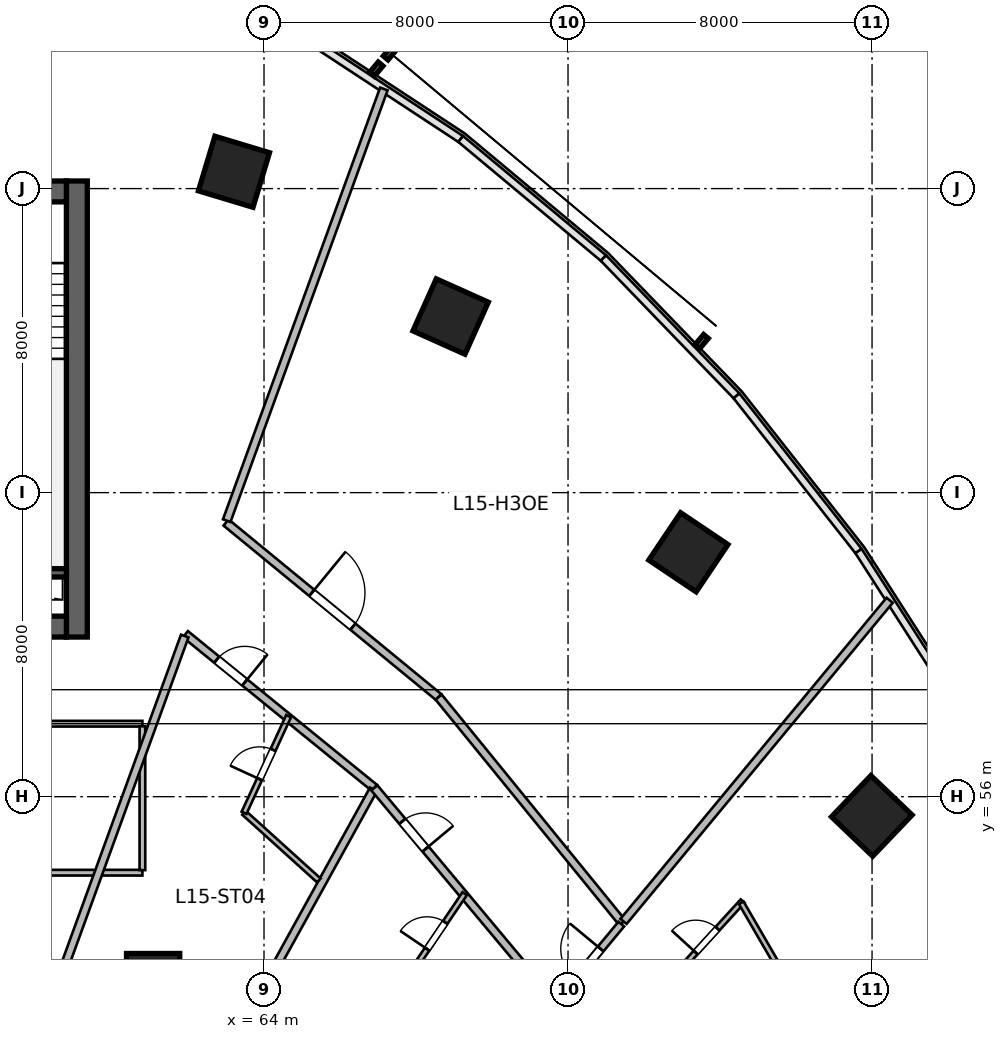
"""IFC4 building model, lengths in metres.
Left out: names, types, materials, properties, quantities, classifications, styles, units other than length and angle.
Written with IfcOpenShell. Run it as: python <this file> out.ifc"""

import sys

from ifc_helpers import new_model, si_unit, direction, frame, frame_2d, origin, origin_2d, place, context, subcontext, project, spatial, rectangle, circle, extrude, source, transform, mapped, element, fill, save


model = new_model("IFC4")
c1 = context("Model", 3, precision=1e-05, world=origin(), true_north=direction((0.0, 1.0)))
c2 = subcontext(c1, "Body", "Model", "MODEL_VIEW")
j1 = project(units=[si_unit("LENGTHUNIT", "METRE"), si_unit("PLANEANGLEUNIT", "RADIAN")], contexts=[c1])
p1 = place(None, origin())
s1 = spatial("IfcSite", under=j1, at=p1, CompositionType="ELEMENT")
p2 = place(p1, origin())
s2 = spatial("IfcBuilding", under=s1, at=p2, CompositionType="ELEMENT")
p3 = place(p2, frame((0.0, 0.0, 67.8)))
s3 = spatial("IfcBuildingStorey", under=s2, at=p3, CompositionType="ELEMENT", Elevation=67.8)
m1 = source(origin(), c2, "Body", "SweptSolid", [
    extrude(rectangle(XDim=12.0, YDim=0.55, at=frame_2d((6.0, 0.0))), origin(), (0.0, 0.0, 1.0), 3.6),
])
p4 = place(p3, frame((59.075, 60.2, 0.0), z_axis=(0.0, 0.0, 1.0), x_axis=(0.0, 1.0, 0.0)))
e1 = element("IfcWall", 1, at=p4, inside=s3, PredefinedType="SHEAR", context=c2, shape_type="MappedRepresentation", body=[
    mapped(m1, transform((0.0, 0.0, 0.0), scale=1.0)),
])
m2 = source(origin(), c2, "Body", "SweptSolid", [
    extrude(rectangle(XDim=21.6, YDim=0.55, at=frame_2d((10.8, 0.0))), origin(), (0.0, 0.0, 1.0), 3.6),
])
p5 = place(p3, frame((37.2, 60.475, 0.0), z_axis=(0.0, 0.0, 1.0), x_axis=(1.0, 0.0, 0.0)))
e2 = element("IfcWall", 2, at=p5, inside=s3, PredefinedType="SHEAR", context=c2, shape_type="MappedRepresentation", body=[
    mapped(m2, transform((0.0, 0.0, 0.0), scale=1.0)),
])
p6 = place(p5, frame((1.1, 0.0, 0.0)))
e3 = element("IfcOpeningElement", 3, at=p6, cuts=e2, PredefinedType="OPENING", context=c2, shape_type="SweptSolid", body=[
    extrude(rectangle(XDim=1.15, YDim=2.15, at=frame_2d((0.575, 1.075))), frame((0.0, 0.285, 0.0), z_axis=(0.0, -1.0, 0.0), x_axis=(1.0, 0.0, 0.0)), (0.0, 0.0, 1.0), 0.57),
])
p7 = place(p5, frame((19.5, 0.0, 0.0)))
e4 = element("IfcOpeningElement", 4, at=p7, cuts=e2, PredefinedType="OPENING", context=c2, shape_type="SweptSolid", body=[
    extrude(rectangle(XDim=0.9, YDim=2.1, at=frame_2d((0.45, 1.05))), frame((0.0, 0.285, 0.0), z_axis=(0.0, -1.0, 0.0), x_axis=(1.0, 0.0, 0.0)), (0.0, 0.0, 1.0), 0.57),
])
p8 = place(p5, frame((12.02, 0.0, 0.0)))
e5 = element("IfcOpeningElement", 5, at=p8, cuts=e2, PredefinedType="OPENING", context=c2, shape_type="SweptSolid", body=[
    extrude(rectangle(XDim=1.6, YDim=2.15, at=frame_2d((0.8, 1.075))), frame((0.0, 0.285, 0.0), z_axis=(0.0, -1.0, 0.0), x_axis=(1.0, 0.0, 0.0)), (0.0, 0.0, 1.0), 0.57),
])
p9 = place(p3, frame((37.2, 71.925, 0.0), z_axis=(0.0, 0.0, 1.0), x_axis=(1.0, 0.0, 0.0)))
e6 = element("IfcWall", 6, at=p9, inside=s3, PredefinedType="SHEAR", context=c2, shape_type="MappedRepresentation", body=[
    mapped(m2, transform((0.0, 0.0, 0.0), scale=1.0)),
])
p10 = place(p9, frame((1.2, 0.0, 0.0)))
e7 = element("IfcOpeningElement", 7, at=p10, cuts=e6, PredefinedType="OPENING", context=c2, shape_type="SweptSolid", body=[
    extrude(rectangle(XDim=0.9, YDim=2.1, at=frame_2d((0.45, 1.05))), frame((0.0, 0.285, 0.0), z_axis=(0.0, -1.0, 0.0), x_axis=(1.0, 0.0, 0.0)), (0.0, 0.0, 1.0), 0.57),
])
p11 = place(p9, frame((14.7, 0.0, 0.0)))
e8 = element("IfcOpeningElement", 8, at=p11, cuts=e6, PredefinedType="OPENING", context=c2, shape_type="SweptSolid", body=[
    extrude(rectangle(XDim=1.2, YDim=2.15, at=frame_2d((0.6, 1.075))), frame((0.0, 0.285, 0.0), z_axis=(0.0, -1.0, 0.0), x_axis=(1.0, 0.0, 0.0)), (0.0, 0.0, 1.0), 0.57),
])
p12 = place(p9, frame((4.15, 0.0, 0.0)))
e9 = element("IfcOpeningElement", 9, at=p12, cuts=e6, PredefinedType="OPENING", context=c2, shape_type="SweptSolid", body=[
    extrude(rectangle(XDim=1.3, YDim=2.15, at=frame_2d((0.65, 1.075))), frame((0.0, 0.285, 0.0), z_axis=(0.0, -1.0, 0.0), x_axis=(1.0, 0.0, 0.0)), (0.0, 0.0, 1.0), 0.57),
])
p13 = place(p9, frame((7.1, 0.0, 0.0)))
e10 = element("IfcOpeningElement", 10, at=p13, cuts=e6, PredefinedType="OPENING", context=c2, shape_type="SweptSolid", body=[
    extrude(rectangle(XDim=0.9, YDim=2.1, at=frame_2d((0.45, 1.05))), frame((0.0, 0.285, 0.0), z_axis=(0.0, -1.0, 0.0), x_axis=(1.0, 0.0, 0.0)), (0.0, 0.0, 1.0), 0.57),
])
m3 = source(origin(), c2, "Body", "SweptSolid", [
    extrude(rectangle(XDim=3.27, YDim=0.22, at=frame_2d((1.635, 0.0))), origin(), (0.0, 0.0, 1.0), 3.6),
])
p14 = place(p3, frame((55.53, 61.89, 0.0), z_axis=(0.0, 0.0, 1.0), x_axis=(1.0, 0.0, 0.0)))
e11 = element("IfcWall", 11, at=p14, inside=s3, PredefinedType="SHEAR", context=c2, shape_type="MappedRepresentation", body=[
    mapped(m3, transform((0.0, 0.0, 0.0), scale=1.0)),
])
m4 = source(origin(), c2, "Body", "SweptSolid", [
    extrude(rectangle(XDim=1.5, YDim=1.5, at=origin_2d()), origin(), (0.0, 0.0, 1.0), 3.6),
])
p15 = place(p3, frame((63.209, 72.442, 0.0), z_axis=(0.0, 0.0, 1.0), x_axis=(0.288697611798, 0.957420330337, 0.0)))
e12 = element("IfcColumn", 12, at=p15, inside=s3, PredefinedType="COLUMN", context=c2, shape_type="MappedRepresentation", body=[
    mapped(m4, transform((0.0, 0.0, 0.0), scale=1.0)),
])
m5 = source(origin(), c2, "Body", "SweptSolid", [
    extrude(circle(Radius=0.7, at=origin_2d()), origin(), (0.0, 0.0, 1.0), 3.6),
])
p16 = place(p3, frame((61.082, 51.175, 0.0), z_axis=(0.0, 0.0, 1.0), x_axis=(0.409126902895, 0.912477494148, 0.0)))
e13 = element("IfcColumn", 13, at=p16, inside=s3, PredefinedType="COLUMN", context=c2, shape_type="MappedRepresentation", body=[
    mapped(m5, transform((0.0, 0.0, 0.0), scale=1.0)),
])
for number, where, z_axis, x_axis in (
    (14, (68.91, 68.633, 0.0), (0.0, 0.0, 1.0), (0.409, 0.912, 0.0)),
    (15, (75.167, 62.43, 0.0), (0.0, 0.0, 1.0), (0.558, 0.83, 0.0)),
    (16, (79.993, 55.494, 0.0), (0.0, 0.0, 1.0), (0.691, 0.723, 0.0)),
):
    element("IfcColumn", number, at=place(p3, frame(where, z_axis=z_axis, x_axis=x_axis)), inside=s3, PredefinedType="COLUMN", context=c2, shape_type="MappedRepresentation", body=[
        mapped(m4, transform((0.0, 0.0, 0.0), scale=1.0)),
    ])
m6 = source(origin(), c2, "Body", "SweptSolid", [
    extrude(rectangle(XDim=6.6, YDim=0.15, at=frame_2d((3.3, 0.0))), origin(), (0.0, 0.0, 1.0), 2.803),
])
p17 = place(p3, frame((54.2, 54.0, 0.0), z_axis=(0.0, 0.0, 1.0), x_axis=(1.0, 0.0, 0.0)))
e17 = element("IfcWall", 17, at=p17, inside=s3, PredefinedType="PARTITIONING", context=c2, shape_type="MappedRepresentation", body=[
    mapped(m6, transform((0.0, 0.0, 0.0), scale=1.0)),
])
m7 = source(origin(), c2, "Body", "SweptSolid", [
    extrude(rectangle(XDim=6.6, YDim=0.15, at=frame_2d((3.3, 0.0))), origin(), (0.0, 0.0, 1.0), 3.36),
])
p18 = place(p3, frame((54.2, 57.92, 0.0), z_axis=(0.0, 0.0, 1.0), x_axis=(1.0, 0.0, 0.0)))
e18 = element("IfcWall", 18, at=p18, inside=s3, PredefinedType="PARTITIONING", context=c2, shape_type="MappedRepresentation", body=[
    mapped(m7, transform((0.0, 0.0, 0.0), scale=1.0)),
])
p19 = place(p18, frame((2.825, 0.0, 0.0)))
e19 = element("IfcOpeningElement", 19, at=p19, cuts=e18, PredefinedType="OPENING", context=c2, shape_type="SweptSolid", body=[
    extrude(rectangle(XDim=0.95, YDim=2.1, at=frame_2d((0.475, 1.05))), frame((0.0, 0.085, 0.0), z_axis=(0.0, -1.0, 0.0), x_axis=(1.0, 0.0, 0.0)), (0.0, 0.0, 1.0), 0.17),
])
m8 = source(origin(), c2, "Body", "SweptSolid", [
    extrude(rectangle(XDim=3.785, YDim=0.15, at=frame_2d((1.893, 0.0))), origin(), (0.0, 0.0, 1.0), 3.36),
])
p20 = place(p3, frame((60.8, 54.067, 0.0), z_axis=(0.0, 0.0, 1.0), x_axis=(0.0, 1.0, 0.0)))
e20 = element("IfcWall", 20, at=p20, inside=s3, PredefinedType="PARTITIONING", context=c2, shape_type="MappedRepresentation", body=[
    mapped(m8, transform((0.0, 0.0, 0.0), scale=1.0)),
])
m9 = source(origin(), c2, "Body", "SweptSolid", [
    extrude(rectangle(XDim=7.237, YDim=0.21, at=frame_2d((3.618, 0.0))), origin(), (0.0, 0.0, 1.0), 3.36),
])
p21 = place(p3, frame((63.001, 63.214, 0.0), z_axis=(0.0, 0.0, 1.0), x_axis=(0.772813707793, -0.634632943557, 0.0)))
e21 = element("IfcWall", 21, at=p21, inside=s3, PredefinedType="PARTITIONING", context=c2, shape_type="MappedRepresentation", body=[
    mapped(m9, transform((0.0, 0.0, 0.0), scale=1.0)),
])
p22 = place(p21, frame((2.918, 0.0, 0.0)))
e22 = element("IfcOpeningElement", 22, at=p22, cuts=e21, PredefinedType="OPENING", context=c2, shape_type="SweptSolid", body=[
    extrude(rectangle(XDim=1.4, YDim=2.15, at=frame_2d((0.7, 1.075))), frame((0.0, 0.115, 0.0), z_axis=(0.0, -1.0, 0.0), x_axis=(1.0, 0.0, 0.0)), (0.0, 0.0, 1.0), 0.23),
])
m10 = source(origin(), c2, "Body", "SweptSolid", [
    extrude(rectangle(XDim=7.659, YDim=0.21, at=frame_2d((3.829, 0.0))), origin(), (0.0, 0.0, 1.0), 3.36),
])
p23 = place(p3, frame((68.594, 58.621, 0.0), z_axis=(0.0, 0.0, 1.0), x_axis=(0.631489868862, -0.775384127723, 0.0)))
e23 = element("IfcWall", 23, at=p23, inside=s3, PredefinedType="PARTITIONING", context=c2, shape_type="MappedRepresentation", body=[
    mapped(m10, transform((0.0, 0.0, 0.0), scale=1.0)),
])
m11 = source(origin(), c2, "Body", "SweptSolid", [
    extrude(rectangle(XDim=12.088, YDim=0.21, at=frame_2d((6.044, 0.0))), origin(), (0.0, 0.0, 1.0), 3.36),
])
p24 = place(p3, frame((63.019, 63.262, 0.0), z_axis=(0.0, 0.0, 1.0), x_axis=(0.34203007529, 0.939689005787, 0.0)))
e24 = element("IfcWall", 24, at=p24, inside=s3, PredefinedType="PARTITIONING", context=c2, shape_type="MappedRepresentation", body=[
    mapped(m11, transform((0.0, 0.0, 0.0), scale=1.0)),
])
m12 = source(origin(), c2, "Body", "SweptSolid", [
    extrude(rectangle(XDim=10.975, YDim=0.21, at=frame_2d((5.487, 0.0))), origin(), (0.0, 0.0, 1.0), 3.36),
])
p25 = place(p3, frame((73.46, 52.719, 0.0), z_axis=(0.0, 0.0, 1.0), x_axis=(0.638125265812, 0.769932558821, 0.0)))
e25 = element("IfcWall", 25, at=p25, inside=s3, PredefinedType="PARTITIONING", context=c2, shape_type="MappedRepresentation", body=[
    mapped(m12, transform((0.0, 0.0, 0.0), scale=1.0)),
])
m13 = source(origin(), c2, "Body", "SweptSolid", [
    extrude(rectangle(XDim=6.408, YDim=0.21, at=frame_2d((3.204, 0.0))), origin(), (0.0, 0.0, 1.0), 3.36),
])
p26 = place(p3, frame((61.931, 60.275, 0.0), z_axis=(0.0, 0.0, 1.0), x_axis=(0.775878552904, -0.630882295792, 0.0)))
e26 = element("IfcWall", 26, at=p26, inside=s3, PredefinedType="PARTITIONING", context=c2, shape_type="MappedRepresentation", body=[
    mapped(m13, transform((0.0, 0.0, 0.0), scale=1.0)),
])
p27 = place(p26, frame((1.063, 0.0, 0.0)))
e27 = element("IfcOpeningElement", 27, at=p27, cuts=e26, PredefinedType="OPENING", context=c2, shape_type="SweptSolid", body=[
    extrude(rectangle(XDim=0.95, YDim=2.15, at=frame_2d((0.475, 1.075))), frame((0.0, 0.115, 0.0), z_axis=(0.0, -1.0, 0.0), x_axis=(1.0, 0.0, 0.0)), (0.0, 0.0, 1.0), 0.23),
])
m14 = source(origin(), c2, "Body", "SweptSolid", [
    extrude(rectangle(XDim=12.196, YDim=0.21, at=frame_2d((6.098, 0.0))), origin(), (0.0, 0.0, 1.0), 3.36),
])
p28 = place(p3, frame((57.742, 48.766, 0.0), z_axis=(0.0, 0.0, 1.0), x_axis=(0.342022711534, 0.939691686031, 0.0)))
e28 = element("IfcWall", 28, at=p28, inside=s3, PredefinedType="PARTITIONING", context=c2, shape_type="MappedRepresentation", body=[
    mapped(m14, transform((0.0, 0.0, 0.0), scale=1.0)),
])
m15 = source(origin(), c2, "Body", "SweptSolid", [
    extrude(rectangle(XDim=11.692, YDim=0.21, at=frame_2d((5.846, 0.0))), origin(), (0.0, 0.0, 1.0), 3.093),
])
p29 = place(p3, frame((61.228, 45.954, 0.0), z_axis=(0.0, 0.0, 1.0), x_axis=(0.483398579324, 0.875400373262, 0.0)))
e29 = element("IfcWall", 29, at=p29, inside=s3, PredefinedType="PARTITIONING", context=c2, shape_type="MappedRepresentation", body=[
    mapped(m15, transform((0.0, 0.0, 0.0), scale=1.0)),
])
m16 = source(origin(), c2, "Body", "SweptSolid", [
    extrude(rectangle(XDim=2.653, YDim=0.14, at=frame_2d((1.327, 0.0))), origin(), (0.0, 0.0, 1.0), 2.877),
])
p30 = place(p3, frame((63.475, 55.576, 0.0), z_axis=(0.0, 0.0, 1.0), x_axis=(0.741731938744, -0.67069645224, 0.0)))
e30 = element("IfcWall", 30, at=p30, inside=s3, PredefinedType="PARTITIONING", context=c2, shape_type="MappedRepresentation", body=[
    mapped(m16, transform((0.0, 0.0, 0.0), scale=1.0)),
])
m17 = source(origin(), c2, "Body", "SweptSolid", [
    extrude(rectangle(XDim=2.799, YDim=0.14, at=frame_2d((1.4, 0.0))), origin(), (0.0, 0.0, 1.0), 3.36),
])
p31 = place(p3, frame((63.475, 55.576, 0.0), z_axis=(0.0, 0.0, 1.0), x_axis=(0.418626740412, 0.908158384981, 0.0)))
e31 = element("IfcWall", 31, at=p31, inside=s3, PredefinedType="PARTITIONING", context=c2, shape_type="MappedRepresentation", body=[
    mapped(m17, transform((0.0, 0.0, 0.0), scale=1.0)),
])
p32 = place(p31, frame((0.975, 0.0, 0.0)))
e32 = element("IfcOpeningElement", 32, at=p32, cuts=e31, PredefinedType="OPENING", context=c2, shape_type="SweptSolid", body=[
    extrude(rectangle(XDim=0.85, YDim=2.05, at=frame_2d((0.425, 1.025))), frame((0.0, 0.08, 0.0), z_axis=(0.0, -1.0, 0.0), x_axis=(1.0, 0.0, 0.0)), (0.0, 0.0, 1.0), 0.16),
])
m18 = source(origin(), c2, "Body", "SweptSolid", [
    extrude(rectangle(XDim=6.764, YDim=0.21, at=frame_2d((3.382, 0.0))), origin(), (0.0, 0.0, 1.0), 3.36),
])
p33 = place(p3, frame((66.904, 56.232, 0.0), z_axis=(0.0, 0.0, 1.0), x_axis=(0.641433176235, -0.767178910311, 0.0)))
e33 = element("IfcWall", 33, at=p33, inside=s3, PredefinedType="PARTITIONING", context=c2, shape_type="MappedRepresentation", body=[
    mapped(m18, transform((0.0, 0.0, 0.0), scale=1.0)),
])
p34 = place(p33, frame((1.148, 0.0, 0.0)))
e34 = element("IfcOpeningElement", 34, at=p34, cuts=e33, PredefinedType="OPENING", context=c2, shape_type="SweptSolid", body=[
    extrude(rectangle(XDim=0.95, YDim=2.15, at=frame_2d((0.475, 1.075))), frame((0.0, 0.115, 0.0), z_axis=(0.0, -1.0, 0.0), x_axis=(1.0, 0.0, 0.0)), (0.0, 0.0, 1.0), 0.23),
])
m19 = source(origin(), c2, "Body", "SweptSolid", [
    extrude(rectangle(XDim=2.673, YDim=0.14, at=frame_2d((1.336, 0.0))), origin(), (0.0, 0.0, 1.0), 2.644),
])
p35 = place(p3, frame((67.782, 51.234, 0.0), z_axis=(0.0, 0.0, 1.0), x_axis=(0.560399679065, 0.828222312972, 0.0)))
e35 = element("IfcWall", 35, at=p35, inside=s3, PredefinedType="PARTITIONING", context=c2, shape_type="MappedRepresentation", body=[
    mapped(m19, transform((0.0, 0.0, 0.0), scale=1.0)),
])
p36 = place(p35, frame((0.911, 0.0, 0.0)))
e36 = element("IfcOpeningElement", 36, at=p36, cuts=e35, PredefinedType="OPENING", context=c2, shape_type="SweptSolid", body=[
    extrude(rectangle(XDim=0.85, YDim=2.05, at=frame_2d((0.425, 1.025))), frame((0.0, 0.08, 0.0), z_axis=(0.0, -1.0, 0.0), x_axis=(1.0, 0.0, 0.0)), (0.0, 0.0, 1.0), 0.16),
])
m20 = source(origin(), c2, "Body", "SweptSolid", [
    extrude(rectangle(XDim=2.748, YDim=0.195, at=frame_2d((1.374, 0.0))), origin(), (0.0, 0.0, 1.0), 3.36),
])
p37 = place(p3, frame((71.647, 50.531, 0.0), z_axis=(0.0, 0.0, 1.0), x_axis=(0.638111168284, 0.769944242729, 0.0)))
e37 = element("IfcWall", 37, at=p37, inside=s3, PredefinedType="PARTITIONING", context=c2, shape_type="MappedRepresentation", body=[
    mapped(m20, transform((0.0, 0.0, 0.0), scale=1.0)),
])
p38 = place(p37, frame((0.849, 0.0, 0.0)))
e38 = element("IfcOpeningElement", 38, at=p38, cuts=e37, PredefinedType="OPENING", context=c2, shape_type="SweptSolid", body=[
    extrude(rectangle(XDim=1.05, YDim=2.15, at=frame_2d((0.525, 1.075))), frame((0.0, 0.107, 0.0), z_axis=(0.0, -1.0, 0.0), x_axis=(1.0, 0.0, 0.0)), (0.0, 0.0, 1.0), 0.215),
])
m21 = source(origin(), c2, "Body", "SweptSolid", [
    extrude(rectangle(XDim=2.812, YDim=0.14, at=frame_2d((1.406, 0.0))), origin(), (0.0, 0.0, 1.0), 3.36),
])
p39 = place(p3, frame((74.697, 51.177, 0.0), z_axis=(0.0, 0.0, 1.0), x_axis=(0.675119025852, 0.737708818527, 0.0)))
e39 = element("IfcWall", 39, at=p39, inside=s3, PredefinedType="PARTITIONING", context=c2, shape_type="MappedRepresentation", body=[
    mapped(m21, transform((0.0, 0.0, 0.0), scale=1.0)),
])
p40 = place(p39, frame((0.981, 0.0, 0.0)))
e40 = element("IfcOpeningElement", 40, at=p40, cuts=e39, PredefinedType="OPENING", context=c2, shape_type="SweptSolid", body=[
    extrude(rectangle(XDim=0.85, YDim=2.05, at=frame_2d((0.425, 1.025))), frame((0.0, 0.08, 0.0), z_axis=(0.0, -1.0, 0.0), x_axis=(1.0, 0.0, 0.0)), (0.0, 0.0, 1.0), 0.16),
])
m22 = source(origin(), c2, "Body", "SweptSolid", [
    extrude(rectangle(XDim=2.045, YDim=0.14, at=frame_2d((1.022, 0.0))), origin(), (0.0, 0.0, 1.0), 3.36),
])
p41 = place(p3, frame((76.557, 53.209, 0.0), z_axis=(0.0, 0.0, 1.0), x_axis=(0.5023112139, -0.864686905411, 0.0)))
e41 = element("IfcWall", 41, at=p41, inside=s3, PredefinedType="PARTITIONING", context=c2, shape_type="MappedRepresentation", body=[
    mapped(m22, transform((0.0, 0.0, 0.0), scale=1.0)),
])
m23 = source(origin(), c2, "Body", "SweptSolid", [
    extrude(rectangle(XDim=1.4, YDim=2.15, at=frame_2d((0.7, 1.075))), frame((0.0, 0.025, 0.0), z_axis=(0.0, -1.0, 0.0), x_axis=(1.0, 0.0, 0.0)), (0.0, 0.0, 1.0), 0.05),
])
p42 = place(p22, origin())
e42 = element("IfcDoor", 42, at=p42, inside=s3, OperationType="SINGLE_SWING_LEFT", PredefinedType="DOOR", context=c2, shape_type="MappedRepresentation", body=[
    mapped(m23, transform((0.0, 0.0, 0.0), scale=1.0)),
])
fill(e22, e42)
m24 = source(origin(), c2, "Body", "SweptSolid", [
    extrude(rectangle(XDim=0.95, YDim=2.15, at=frame_2d((0.475, 1.075))), frame((0.0, 0.025, 0.0), z_axis=(0.0, -1.0, 0.0), x_axis=(1.0, 0.0, 0.0)), (0.0, 0.0, 1.0), 0.05),
])
p43 = place(p27, origin())
e43 = element("IfcDoor", 43, at=p43, inside=s3, OperationType="SINGLE_SWING_RIGHT", PredefinedType="DOOR", context=c2, shape_type="MappedRepresentation", body=[
    mapped(m24, transform((0.0, 0.0, 0.0), scale=1.0)),
])
fill(e27, e43)
m25 = source(origin(), c2, "Body", "SweptSolid", [
    extrude(rectangle(XDim=0.85, YDim=2.05, at=frame_2d((0.425, 1.025))), frame((0.0, 0.025, 0.0), z_axis=(0.0, -1.0, 0.0), x_axis=(1.0, 0.0, 0.0)), (0.0, 0.0, 1.0), 0.05),
])
p44 = place(p32, origin())
e44 = element("IfcDoor", 44, at=p44, inside=s3, OperationType="SINGLE_SWING_LEFT", PredefinedType="DOOR", context=c2, shape_type="MappedRepresentation", body=[
    mapped(m25, transform((0.0, 0.0, 0.0), scale=1.0)),
])
fill(e32, e44)
p45 = place(p34, origin())
e45 = element("IfcDoor", 45, at=p45, inside=s3, OperationType="SINGLE_SWING_RIGHT", PredefinedType="DOOR", context=c2, shape_type="MappedRepresentation", body=[
    mapped(m24, transform((0.0, 0.0, 0.0), scale=1.0)),
])
fill(e34, e45)
p46 = place(p36, origin())
e46 = element("IfcDoor", 46, at=p46, inside=s3, OperationType="SINGLE_SWING_LEFT", PredefinedType="DOOR", context=c2, shape_type="MappedRepresentation", body=[
    mapped(m25, transform((0.0, 0.0, 0.0), scale=1.0)),
])
fill(e36, e46)
m26 = source(origin(), c2, "Body", "SweptSolid", [
    extrude(rectangle(XDim=1.05, YDim=2.15, at=frame_2d((0.525, 1.075))), frame((0.0, 0.025, 0.0), z_axis=(0.0, -1.0, 0.0), x_axis=(1.0, 0.0, 0.0)), (0.0, 0.0, 1.0), 0.05),
])
p47 = place(p38, origin())
e47 = element("IfcDoor", 47, at=p47, inside=s3, OperationType="SINGLE_SWING_RIGHT", PredefinedType="DOOR", context=c2, shape_type="MappedRepresentation", body=[
    mapped(m26, transform((0.0, 0.0, 0.0), scale=1.0)),
])
fill(e38, e47)
p48 = place(p40, origin())
e48 = element("IfcDoor", 48, at=p48, inside=s3, OperationType="SINGLE_SWING_LEFT", PredefinedType="DOOR", context=c2, shape_type="MappedRepresentation", body=[
    mapped(m25, transform((0.0, 0.0, 0.0), scale=1.0)),
])
fill(e40, e48)
save(model, sys.argv[1])
